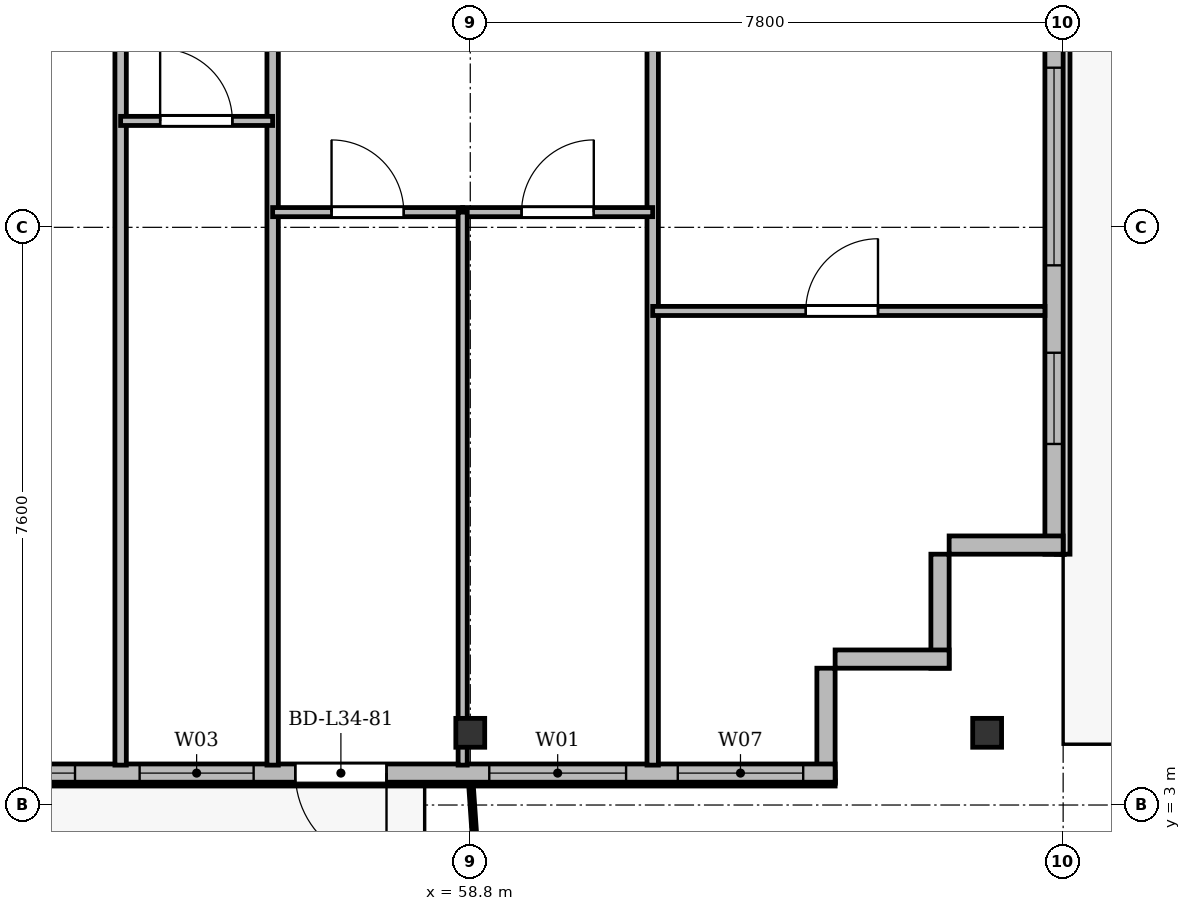
"""IFC4 building model, lengths in metres.
Left out: names, types, materials, properties, quantities, classifications, styles, units other than length and angle.
Written with IfcOpenShell. Run it as: python <this file> out.ifc"""

import sys

from ifc_helpers import new_model, si_unit, direction, frame, frame_2d, origin, origin_2d, place, context, subcontext, project, spatial, rectangle, i_section, extrude, source, transform, mapped, element, fill, save


model = new_model("IFC4")
c1 = context("Model", 3, precision=1e-05, world=origin(), true_north=direction((0.0, 1.0)))
c2 = subcontext(c1, "Body", "Model", "MODEL_VIEW")
j1 = project(units=[si_unit("LENGTHUNIT", "METRE"), si_unit("PLANEANGLEUNIT", "RADIAN")], contexts=[c1])
p1 = place(None, origin())
s1 = spatial("IfcSite", under=j1, at=p1, CompositionType="ELEMENT")
p2 = place(p1, origin())
s2 = spatial("IfcBuilding", under=s1, at=p2, CompositionType="ELEMENT")
p3 = place(p2, frame((0.0, 0.0, 132.1)))
s3 = spatial("IfcBuildingStorey", under=s2, at=p3, CompositionType="ELEMENT", Elevation=132.1)
m1 = source(origin(), c2, "Body", "SweptSolid", [
    extrude(i_section(OverallWidth=0.38, OverallDepth=0.38, WebThickness=0.02, FlangeThickness=0.03, at=origin_2d()), origin(), (0.0, 0.0, 1.0), 3.6),
])
for number, where, z_axis, x_axis in (
    (1, (58.8, 3.95, 0.0), (0.0, 0.0, 1.0), (1.0, 0.0, 0.0)),
    (2, (65.6, 3.95, 0.0), (0.0, 0.0, 1.0), (1.0, 0.0, 0.0)),
):
    element("IfcColumn", number, at=place(p3, frame(where, z_axis=z_axis, x_axis=x_axis)), inside=s3, PredefinedType="COLUMN", context=c2, shape_type="MappedRepresentation", body=[
        mapped(m1, transform((0.0, 0.0, 0.0), x_axis=(1.0, 0.0, 0.0), y_axis=(0.0, 1.0, 0.0), z_axis=(0.0, 0.0, 1.0), scale=1.0)),
    ])
p4 = place(p3, frame((66.48, 45.5, 0.0), z_axis=(0.0, 0.0, 1.0), x_axis=(0.0, -1.0, 0.0)))
e3 = element("IfcWall", 3, at=p4, inside=s3, PredefinedType="SOLIDWALL", context=c2, shape_type="SweptSolid", body=[
    extrude(rectangle(XDim=39.2, YDim=0.24, at=frame_2d((19.6, 0.0))), origin(), (0.0, 0.0, 1.0), 3.35),
])
p5 = place(p4, frame((9.6, 0.0, 0.0)))
e4 = element("IfcOpeningElement", 4, at=p5, cuts=e3, PredefinedType="OPENING", context=c2, shape_type="SweptSolid", body=[
    extrude(rectangle(XDim=1.2, YDim=2.2, at=frame_2d((0.6, 1.1))), frame((0.0, 0.13, 0.0), z_axis=(0.0, -1.0, 0.0), x_axis=(1.0, 0.0, 0.0)), (0.0, 0.0, 1.0), 0.26),
])
p6 = place(p4, frame((36.55, 0.0, 0.92)))
e5 = element("IfcOpeningElement", 5, at=p6, cuts=e3, PredefinedType="OPENING", context=c2, shape_type="SweptSolid", body=[
    extrude(rectangle(XDim=1.2, YDim=1.65, at=frame_2d((0.6, 0.825))), frame((0.0, 0.13, 0.0), z_axis=(0.0, -1.0, 0.0), x_axis=(1.0, 0.0, 0.0)), (0.0, 0.0, 1.0), 0.26),
])
p7 = place(p4, frame((32.8, 0.0, 0.92)))
e6 = element("IfcOpeningElement", 6, at=p7, cuts=e3, PredefinedType="OPENING", context=c2, shape_type="SweptSolid", body=[
    extrude(rectangle(XDim=2.6, YDim=1.9, at=frame_2d((1.3, 0.95))), frame((0.0, 0.13, 0.0), z_axis=(0.0, -1.0, 0.0), x_axis=(1.0, 0.0, 0.0)), (0.0, 0.0, 1.0), 0.26),
])
p8 = place(p4, frame((28.6, 0.0, 0.92)))
e7 = element("IfcOpeningElement", 7, at=p8, cuts=e3, PredefinedType="OPENING", context=c2, shape_type="SweptSolid", body=[
    extrude(rectangle(XDim=2.6, YDim=1.9, at=frame_2d((1.3, 0.95))), frame((0.0, 0.13, 0.0), z_axis=(0.0, -1.0, 0.0), x_axis=(1.0, 0.0, 0.0)), (0.0, 0.0, 1.0), 0.26),
])
p9 = place(p4, frame((21.4, 0.0, 0.92)))
e8 = element("IfcOpeningElement", 8, at=p9, cuts=e3, PredefinedType="OPENING", context=c2, shape_type="SweptSolid", body=[
    extrude(rectangle(XDim=2.6, YDim=1.9, at=frame_2d((1.3, 0.95))), frame((0.0, 0.13, 0.0), z_axis=(0.0, -1.0, 0.0), x_axis=(1.0, 0.0, 0.0)), (0.0, 0.0, 1.0), 0.26),
])
p10 = place(p4, frame((4.5, 0.0, 0.92)))
e9 = element("IfcOpeningElement", 9, at=p10, cuts=e3, PredefinedType="OPENING", context=c2, shape_type="SweptSolid", body=[
    extrude(rectangle(XDim=1.2, YDim=1.65, at=frame_2d((0.6, 0.825))), frame((0.0, 0.13, 0.0), z_axis=(0.0, -1.0, 0.0), x_axis=(1.0, 0.0, 0.0)), (0.0, 0.0, 1.0), 0.26),
])
p11 = place(p4, frame((1.15, 0.0, 0.92)))
e10 = element("IfcOpeningElement", 10, at=p11, cuts=e3, PredefinedType="OPENING", context=c2, shape_type="SweptSolid", body=[
    extrude(rectangle(XDim=1.2, YDim=1.65, at=frame_2d((0.6, 0.825))), frame((0.0, 0.13, 0.0), z_axis=(0.0, -1.0, 0.0), x_axis=(1.0, 0.0, 0.0)), (0.0, 0.0, 1.0), 0.26),
])
p12 = place(p3, frame((66.6, 6.42, 0.0), z_axis=(0.0, 0.0, 1.0), x_axis=(-1.0, 0.0, 0.0)))
e11 = element("IfcWall", 11, at=p12, inside=s3, PredefinedType="SOLIDWALL", context=c2, shape_type="SweptSolid", body=[
    extrude(rectangle(XDim=1.5, YDim=0.24, at=frame_2d((0.75, 0.0))), origin(), (0.0, 0.0, 1.0), 2.85),
])
for number, where, z_axis, x_axis in (
    (12, (64.98, 6.3, 0.0), (0.0, 0.0, 1.0), (0.0, -1.0, 0.0)),
    (13, (65.1, 4.92, 0.0), (0.0, 0.0, 1.0), (-1.0, 0.0, 0.0)),
):
    element("IfcWall", number, at=place(p3, frame(where, z_axis=z_axis, x_axis=x_axis)), inside=s3, PredefinedType="SOLIDWALL", context=c2, shape_type="SweptSolid", body=[
        extrude(rectangle(XDim=1.5, YDim=0.24, at=frame_2d((0.75, 0.0))), origin(), (0.0, 0.0, 1.0), 3.35),
    ])
p13 = place(p3, frame((63.48, 4.8, 0.0), z_axis=(0.0, 0.0, 1.0), x_axis=(0.0, -1.0, 0.0)))
e14 = element("IfcWall", 14, at=p13, inside=s3, PredefinedType="SOLIDWALL", context=c2, shape_type="SweptSolid", body=[
    extrude(rectangle(XDim=1.5, YDim=0.24, at=frame_2d((0.75, 0.0))), origin(), (0.0, 0.0, 1.0), 2.75),
])
p14 = place(p3, frame((63.6, 3.42, 0.0), z_axis=(0.0, 0.0, 1.0), x_axis=(-1.0, 0.0, 0.0)))
e15 = element("IfcWall", 15, at=p14, inside=s3, PredefinedType="SOLIDWALL", context=c2, shape_type="SweptSolid", body=[
    extrude(rectangle(XDim=52.8, YDim=0.24, at=frame_2d((26.4, 0.0))), origin(), (0.0, 0.0, 1.0), 3.35),
])
p15 = place(p14, frame((0.42, 0.0, 0.9)))
e16 = element("IfcOpeningElement", 16, at=p15, cuts=e15, PredefinedType="OPENING", context=c2, shape_type="SweptSolid", body=[
    extrude(rectangle(XDim=1.65, YDim=1.85, at=frame_2d((0.825, 0.925))), frame((0.0, 0.13, 0.0), z_axis=(0.0, -1.0, 0.0), x_axis=(1.0, 0.0, 0.0)), (0.0, 0.0, 1.0), 0.26),
])
p16 = place(p14, frame((2.75, 0.0, 0.9)))
e17 = element("IfcOpeningElement", 17, at=p16, cuts=e15, PredefinedType="OPENING", context=c2, shape_type="SweptSolid", body=[
    extrude(rectangle(XDim=1.8, YDim=1.8, at=frame_2d((0.9, 0.9))), frame((0.0, 0.13, 0.0), z_axis=(0.0, -1.0, 0.0), x_axis=(1.0, 0.0, 0.0)), (0.0, 0.0, 1.0), 0.26),
])
p17 = place(p14, frame((5.902, 0.0, 0.0)))
e18 = element("IfcOpeningElement", 18, at=p17, cuts=e15, PredefinedType="OPENING", context=c2, shape_type="SweptSolid", body=[
    extrude(rectangle(XDim=1.2, YDim=2.2, at=frame_2d((0.6, 1.1))), frame((0.0, 0.13, 0.0), z_axis=(0.0, -1.0, 0.0), x_axis=(1.0, 0.0, 0.0)), (0.0, 0.0, 1.0), 0.26),
])
p18 = place(p14, frame((7.65, 0.0, 0.9)))
e19 = element("IfcOpeningElement", 19, at=p18, cuts=e15, PredefinedType="OPENING", context=c2, shape_type="SweptSolid", body=[
    extrude(rectangle(XDim=1.5, YDim=1.75, at=frame_2d((0.75, 0.875))), frame((0.0, 0.13, 0.0), z_axis=(0.0, -1.0, 0.0), x_axis=(1.0, 0.0, 0.0)), (0.0, 0.0, 1.0), 0.26),
])
p19 = place(p14, frame((10.0, 0.0, 0.9)))
e20 = element("IfcOpeningElement", 20, at=p19, cuts=e15, PredefinedType="OPENING", context=c2, shape_type="SweptSolid", body=[
    extrude(rectangle(XDim=2.0, YDim=1.95, at=frame_2d((1.0, 0.975))), frame((0.0, 0.13, 0.0), z_axis=(0.0, -1.0, 0.0), x_axis=(1.0, 0.0, 0.0)), (0.0, 0.0, 1.0), 0.26),
])
p20 = place(p14, frame((12.975, 0.0, 0.9)))
e21 = element("IfcOpeningElement", 21, at=p20, cuts=e15, PredefinedType="OPENING", context=c2, shape_type="SweptSolid", body=[
    extrude(rectangle(XDim=1.65, YDim=1.85, at=frame_2d((0.825, 0.925))), frame((0.0, 0.13, 0.0), z_axis=(0.0, -1.0, 0.0), x_axis=(1.0, 0.0, 0.0)), (0.0, 0.0, 1.0), 0.26),
])
p21 = place(p14, frame((15.3, 0.0, 0.9)))
e22 = element("IfcOpeningElement", 22, at=p21, cuts=e15, PredefinedType="OPENING", context=c2, shape_type="SweptSolid", body=[
    extrude(rectangle(XDim=1.8, YDim=1.8, at=frame_2d((0.9, 0.9))), frame((0.0, 0.13, 0.0), z_axis=(0.0, -1.0, 0.0), x_axis=(1.0, 0.0, 0.0)), (0.0, 0.0, 1.0), 0.26),
])
p22 = place(p14, frame((17.85, 0.0, 0.9)))
e23 = element("IfcOpeningElement", 23, at=p22, cuts=e15, PredefinedType="OPENING", context=c2, shape_type="SweptSolid", body=[
    extrude(rectangle(XDim=1.5, YDim=1.75, at=frame_2d((0.75, 0.875))), frame((0.0, 0.13, 0.0), z_axis=(0.0, -1.0, 0.0), x_axis=(1.0, 0.0, 0.0)), (0.0, 0.0, 1.0), 0.26),
])
p23 = place(p14, frame((20.7, 0.0, 0.9)))
e24 = element("IfcOpeningElement", 24, at=p23, cuts=e15, PredefinedType="OPENING", context=c2, shape_type="SweptSolid", body=[
    extrude(rectangle(XDim=1.5, YDim=1.75, at=frame_2d((0.75, 0.875))), frame((0.0, 0.13, 0.0), z_axis=(0.0, -1.0, 0.0), x_axis=(1.0, 0.0, 0.0)), (0.0, 0.0, 1.0), 0.26),
])
p24 = place(p14, frame((23.75, 0.0, 0.9)))
e25 = element("IfcOpeningElement", 25, at=p24, cuts=e15, PredefinedType="OPENING", context=c2, shape_type="SweptSolid", body=[
    extrude(rectangle(XDim=2.0, YDim=1.95, at=frame_2d((1.0, 0.975))), frame((0.0, 0.13, 0.0), z_axis=(0.0, -1.0, 0.0), x_axis=(1.0, 0.0, 0.0)), (0.0, 0.0, 1.0), 0.26),
])
p25 = place(p14, frame((28.875, 0.0, 0.9)))
e26 = element("IfcOpeningElement", 26, at=p25, cuts=e15, PredefinedType="OPENING", context=c2, shape_type="SweptSolid", body=[
    extrude(rectangle(XDim=1.65, YDim=1.85, at=frame_2d((0.825, 0.925))), frame((0.0, 0.13, 0.0), z_axis=(0.0, -1.0, 0.0), x_axis=(1.0, 0.0, 0.0)), (0.0, 0.0, 1.0), 0.26),
])
p26 = place(p14, frame((34.478, 0.0, 0.0)))
e27 = element("IfcOpeningElement", 27, at=p26, cuts=e15, PredefinedType="OPENING", context=c2, shape_type="SweptSolid", body=[
    extrude(rectangle(XDim=1.2, YDim=2.2, at=frame_2d((0.6, 1.1))), frame((0.0, 0.13, 0.0), z_axis=(0.0, -1.0, 0.0), x_axis=(1.0, 0.0, 0.0)), (0.0, 0.0, 1.0), 0.26),
])
p27 = place(p14, frame((37.3, 0.0, 0.9)))
e28 = element("IfcOpeningElement", 28, at=p27, cuts=e15, PredefinedType="OPENING", context=c2, shape_type="SweptSolid", body=[
    extrude(rectangle(XDim=2.2, YDim=1.8, at=frame_2d((1.1, 0.9))), frame((0.0, 0.13, 0.0), z_axis=(0.0, -1.0, 0.0), x_axis=(1.0, 0.0, 0.0)), (0.0, 0.0, 1.0), 0.26),
])
p28 = place(p14, frame((41.05, 0.0, 0.9)))
e29 = element("IfcOpeningElement", 29, at=p28, cuts=e15, PredefinedType="OPENING", context=c2, shape_type="SweptSolid", body=[
    extrude(rectangle(XDim=1.5, YDim=1.75, at=frame_2d((0.75, 0.875))), frame((0.0, 0.13, 0.0), z_axis=(0.0, -1.0, 0.0), x_axis=(1.0, 0.0, 0.0)), (0.0, 0.0, 1.0), 0.26),
])
p29 = place(p14, frame((43.65, 0.0, 0.9)))
e30 = element("IfcOpeningElement", 30, at=p29, cuts=e15, PredefinedType="OPENING", context=c2, shape_type="SweptSolid", body=[
    extrude(rectangle(XDim=1.5, YDim=1.75, at=frame_2d((0.75, 0.875))), frame((0.0, 0.13, 0.0), z_axis=(0.0, -1.0, 0.0), x_axis=(1.0, 0.0, 0.0)), (0.0, 0.0, 1.0), 0.26),
])
p30 = place(p14, frame((45.775, 0.0, 0.9)))
e31 = element("IfcOpeningElement", 31, at=p30, cuts=e15, PredefinedType="OPENING", context=c2, shape_type="SweptSolid", body=[
    extrude(rectangle(XDim=1.65, YDim=1.85, at=frame_2d((0.825, 0.925))), frame((0.0, 0.13, 0.0), z_axis=(0.0, -1.0, 0.0), x_axis=(1.0, 0.0, 0.0)), (0.0, 0.0, 1.0), 0.26),
])
p31 = place(p14, frame((48.1, 0.0, 0.9)))
e32 = element("IfcOpeningElement", 32, at=p31, cuts=e15, PredefinedType="OPENING", context=c2, shape_type="SweptSolid", body=[
    extrude(rectangle(XDim=1.8, YDim=1.8, at=frame_2d((0.9, 0.9))), frame((0.0, 0.13, 0.0), z_axis=(0.0, -1.0, 0.0), x_axis=(1.0, 0.0, 0.0)), (0.0, 0.0, 1.0), 0.26),
])
p32 = place(p14, frame((50.705, 0.0, 0.9)))
e33 = element("IfcOpeningElement", 33, at=p32, cuts=e15, PredefinedType="OPENING", context=c2, shape_type="SweptSolid", body=[
    extrude(rectangle(XDim=1.5, YDim=1.75, at=frame_2d((0.75, 0.875))), frame((0.0, 0.13, 0.0), z_axis=(0.0, -1.0, 0.0), x_axis=(1.0, 0.0, 0.0)), (0.0, 0.0, 1.0), 0.26),
])
for number, where, z_axis, x_axis in (
    (34, (61.2, 3.525, 0.0), (0.0, 0.0, 1.0), (0.0, 1.0, 0.0)),
    (35, (54.2, 3.525, 0.0), (0.0, 0.0, 1.0), (0.0, 1.0, 0.0)),
    (36, (56.2, 3.525, 0.0), (0.0, 0.0, 1.0), (0.0, 1.0, 0.0)),
):
    element("IfcWall", number, at=place(p3, frame(where, z_axis=z_axis, x_axis=x_axis)), inside=s3, PredefinedType="PARTITIONING", context=c2, shape_type="SweptSolid", body=[
        extrude(rectangle(XDim=27.275, YDim=0.15, at=frame_2d((13.638, 0.0))), origin(), (0.0, 0.0, 1.0), 2.75),
    ])
p33 = place(p3, frame((54.2, 12.0, 0.0), z_axis=(0.0, 0.0, 1.0), x_axis=(1.0, 0.0, 0.0)))
e37 = element("IfcWall", 37, at=p33, inside=s3, PredefinedType="PARTITIONING", context=c2, shape_type="SweptSolid", body=[
    extrude(rectangle(XDim=2.0, YDim=0.12, at=frame_2d((1.0, 0.0))), origin(), (0.0, 0.0, 1.0), 3.35),
])
p34 = place(p33, frame((0.52, 0.0, 0.0)))
e38 = element("IfcOpeningElement", 38, at=p34, cuts=e37, PredefinedType="OPENING", context=c2, shape_type="SweptSolid", body=[
    extrude(rectangle(XDim=0.95, YDim=2.15, at=frame_2d((0.475, 1.075))), frame((0.0, 0.07, 0.0), z_axis=(0.0, -1.0, 0.0), x_axis=(1.0, 0.0, 0.0)), (0.0, 0.0, 1.0), 0.14),
])
p35 = place(p3, frame((56.2, 10.8, 0.0), z_axis=(0.0, 0.0, 1.0), x_axis=(1.0, 0.0, 0.0)))
e39 = element("IfcWall", 39, at=p35, inside=s3, PredefinedType="PARTITIONING", context=c2, shape_type="SweptSolid", body=[
    extrude(rectangle(XDim=2.5, YDim=0.12, at=frame_2d((1.25, 0.0))), origin(), (0.0, 0.0, 1.0), 3.0),
])
p36 = place(p35, frame((0.775, 0.0, 0.0)))
e40 = element("IfcOpeningElement", 40, at=p36, cuts=e39, PredefinedType="OPENING", context=c2, shape_type="SweptSolid", body=[
    extrude(rectangle(XDim=0.95, YDim=2.15, at=frame_2d((0.475, 1.075))), frame((0.0, 0.07, 0.0), z_axis=(0.0, -1.0, 0.0), x_axis=(1.0, 0.0, 0.0)), (0.0, 0.0, 1.0), 0.14),
])
p37 = place(p3, frame((58.7, 10.8, 0.0), z_axis=(0.0, 0.0, 1.0), x_axis=(1.0, 0.0, 0.0)))
e41 = element("IfcWall", 41, at=p37, inside=s3, PredefinedType="PARTITIONING", context=c2, shape_type="SweptSolid", body=[
    extrude(rectangle(XDim=2.5, YDim=0.12, at=frame_2d((1.25, 0.0))), origin(), (0.0, 0.0, 1.0), 2.85),
])
p38 = place(p37, frame((0.775, 0.0, 0.0)))
e42 = element("IfcOpeningElement", 42, at=p38, cuts=e41, PredefinedType="OPENING", context=c2, shape_type="SweptSolid", body=[
    extrude(rectangle(XDim=0.95, YDim=2.15, at=frame_2d((0.475, 1.075))), frame((0.0, 0.07, 0.0), z_axis=(0.0, -1.0, 0.0), x_axis=(1.0, 0.0, 0.0)), (0.0, 0.0, 1.0), 0.14),
])
p39 = place(p3, frame((58.7, 3.525, 0.0), z_axis=(0.0, 0.0, 1.0), x_axis=(0.0, 1.0, 0.0)))
e43 = element("IfcWall", 43, at=p39, inside=s3, PredefinedType="PARTITIONING", context=c2, shape_type="SweptSolid", body=[
    extrude(rectangle(XDim=7.275, YDim=0.12, at=frame_2d((3.638, 0.0))), origin(), (0.0, 0.0, 1.0), 2.75),
])
p40 = place(p3, frame((61.2, 9.5, 0.0), z_axis=(0.0, 0.0, 1.0), x_axis=(1.0, 0.0, 0.0)))
e44 = element("IfcWall", 44, at=p40, inside=s3, PredefinedType="PARTITIONING", context=c2, shape_type="SweptSolid", body=[
    extrude(rectangle(XDim=5.16, YDim=0.12, at=frame_2d((2.58, 0.0))), origin(), (0.0, 0.0, 1.0), 2.85),
])
p41 = place(p40, frame((2.014, 0.0, 0.0)))
e45 = element("IfcOpeningElement", 45, at=p41, cuts=e44, PredefinedType="OPENING", context=c2, shape_type="SweptSolid", body=[
    extrude(rectangle(XDim=0.95, YDim=2.15, at=frame_2d((0.475, 1.075))), frame((0.0, 0.07, 0.0), z_axis=(0.0, -1.0, 0.0), x_axis=(1.0, 0.0, 0.0)), (0.0, 0.0, 1.0), 0.14),
])
m2 = source(origin(), c2, "Body", "SweptSolid", [
    extrude(rectangle(XDim=1.2, YDim=1.65, at=frame_2d((0.6, 0.825))), frame((0.0, 0.03, 0.0), z_axis=(0.0, -1.0, 0.0), x_axis=(1.0, 0.0, 0.0)), (0.0, 0.0, 1.0), 0.06),
])
p42 = place(p6, origin())
e46 = element("IfcWindow", 46, at=p42, inside=s3, PartitioningType="SINGLE_PANEL", PredefinedType="WINDOW", context=c2, shape_type="MappedRepresentation", body=[
    mapped(m2, transform((0.0, 0.0, 0.0), x_axis=(1.0, 0.0, 0.0), y_axis=(0.0, 1.0, 0.0), z_axis=(0.0, 0.0, 1.0), scale=1.0)),
])
fill(e5, e46)
m3 = source(origin(), c2, "Body", "SweptSolid", [
    extrude(rectangle(XDim=2.6, YDim=1.9, at=frame_2d((1.3, 0.95))), frame((0.0, 0.03, 0.0), z_axis=(0.0, -1.0, 0.0), x_axis=(1.0, 0.0, 0.0)), (0.0, 0.0, 1.0), 0.06),
])
p43 = place(p7, origin())
e47 = element("IfcWindow", 47, at=p43, inside=s3, PartitioningType="SINGLE_PANEL", PredefinedType="WINDOW", context=c2, shape_type="MappedRepresentation", body=[
    mapped(m3, transform((0.0, 0.0, 0.0), x_axis=(1.0, 0.0, 0.0), y_axis=(0.0, 1.0, 0.0), z_axis=(0.0, 0.0, 1.0), scale=1.0)),
])
fill(e6, e47)
m4 = source(origin(), c2, "Body", "SweptSolid", [
    extrude(rectangle(XDim=1.65, YDim=1.85, at=frame_2d((0.825, 0.925))), frame((0.0, 0.03, 0.0), z_axis=(0.0, -1.0, 0.0), x_axis=(1.0, 0.0, 0.0)), (0.0, 0.0, 1.0), 0.06),
])
p44 = place(p15, origin())
e48 = element("IfcWindow", 48, at=p44, inside=s3, PartitioningType="SINGLE_PANEL", PredefinedType="WINDOW", context=c2, shape_type="MappedRepresentation", body=[
    mapped(m4, transform((0.0, 0.0, 0.0), x_axis=(1.0, 0.0, 0.0), y_axis=(0.0, 1.0, 0.0), z_axis=(0.0, 0.0, 1.0), scale=1.0)),
])
fill(e16, e48)
m5 = source(origin(), c2, "Body", "SweptSolid", [
    extrude(rectangle(XDim=1.8, YDim=1.8, at=frame_2d((0.9, 0.9))), frame((0.0, 0.03, 0.0), z_axis=(0.0, -1.0, 0.0), x_axis=(1.0, 0.0, 0.0)), (0.0, 0.0, 1.0), 0.06),
])
p45 = place(p16, origin())
e49 = element("IfcWindow", 49, at=p45, inside=s3, PartitioningType="SINGLE_PANEL", PredefinedType="WINDOW", context=c2, shape_type="MappedRepresentation", body=[
    mapped(m5, transform((0.0, 0.0, 0.0), x_axis=(1.0, 0.0, 0.0), y_axis=(0.0, 1.0, 0.0), z_axis=(0.0, 0.0, 1.0), scale=1.0)),
])
fill(e17, e49)
m6 = source(origin(), c2, "Body", "SweptSolid", [
    extrude(rectangle(XDim=1.2, YDim=2.2, at=frame_2d((0.6, 1.1))), frame((0.0, 0.025, 0.0), z_axis=(0.0, -1.0, 0.0), x_axis=(1.0, 0.0, 0.0)), (0.0, 0.0, 1.0), 0.05),
])
p46 = place(p17, origin())
e50 = element("IfcDoor", 50, at=p46, inside=s3, OperationType="SINGLE_SWING_LEFT", PredefinedType="DOOR", context=c2, shape_type="MappedRepresentation", body=[
    mapped(m6, transform((0.0, 0.0, 0.0), x_axis=(1.0, 0.0, 0.0), y_axis=(0.0, 1.0, 0.0), z_axis=(0.0, 0.0, 1.0), scale=1.0)),
])
fill(e18, e50)
m7 = source(origin(), c2, "Body", "SweptSolid", [
    extrude(rectangle(XDim=1.5, YDim=1.75, at=frame_2d((0.75, 0.875))), frame((0.0, 0.03, 0.0), z_axis=(0.0, -1.0, 0.0), x_axis=(1.0, 0.0, 0.0)), (0.0, 0.0, 1.0), 0.06),
])
p47 = place(p18, origin())
e51 = element("IfcWindow", 51, at=p47, inside=s3, PartitioningType="SINGLE_PANEL", PredefinedType="WINDOW", context=c2, shape_type="MappedRepresentation", body=[
    mapped(m7, transform((0.0, 0.0, 0.0), x_axis=(1.0, 0.0, 0.0), y_axis=(0.0, 1.0, 0.0), z_axis=(0.0, 0.0, 1.0), scale=1.0)),
])
fill(e19, e51)
m8 = source(origin(), c2, "Body", "SweptSolid", [
    extrude(rectangle(XDim=2.0, YDim=1.95, at=frame_2d((1.0, 0.975))), frame((0.0, 0.03, 0.0), z_axis=(0.0, -1.0, 0.0), x_axis=(1.0, 0.0, 0.0)), (0.0, 0.0, 1.0), 0.06),
])
p48 = place(p19, origin())
e52 = element("IfcWindow", 52, at=p48, inside=s3, PartitioningType="SINGLE_PANEL", PredefinedType="WINDOW", context=c2, shape_type="MappedRepresentation", body=[
    mapped(m8, transform((0.0, 0.0, 0.0), x_axis=(1.0, 0.0, 0.0), y_axis=(0.0, 1.0, 0.0), z_axis=(0.0, 0.0, 1.0), scale=1.0)),
])
fill(e20, e52)
m9 = source(origin(), c2, "Body", "SweptSolid", [
    extrude(rectangle(XDim=0.95, YDim=2.15, at=frame_2d((0.475, 1.075))), frame((0.0, 0.025, 0.0), z_axis=(0.0, -1.0, 0.0), x_axis=(1.0, 0.0, 0.0)), (0.0, 0.0, 1.0), 0.05),
])
p49 = place(p34, origin())
e53 = element("IfcDoor", 53, at=p49, inside=s3, OperationType="SINGLE_SWING_LEFT", PredefinedType="DOOR", context=c2, shape_type="MappedRepresentation", body=[
    mapped(m9, transform((0.0, 0.0, 0.0), x_axis=(1.0, 0.0, 0.0), y_axis=(0.0, 1.0, 0.0), z_axis=(0.0, 0.0, 1.0), scale=1.0)),
])
fill(e38, e53)
p50 = place(p36, origin())
e54 = element("IfcDoor", 54, at=p50, inside=s3, OperationType="SINGLE_SWING_LEFT", PredefinedType="DOOR", context=c2, shape_type="MappedRepresentation", body=[
    mapped(m9, transform((0.0, 0.0, 0.0), x_axis=(1.0, 0.0, 0.0), y_axis=(0.0, 1.0, 0.0), z_axis=(0.0, 0.0, 1.0), scale=1.0)),
])
fill(e40, e54)
p51 = place(p38, origin())
e55 = element("IfcDoor", 55, at=p51, inside=s3, OperationType="SINGLE_SWING_RIGHT", PredefinedType="DOOR", context=c2, shape_type="MappedRepresentation", body=[
    mapped(m9, transform((0.0, 0.0, 0.0), x_axis=(1.0, 0.0, 0.0), y_axis=(0.0, 1.0, 0.0), z_axis=(0.0, 0.0, 1.0), scale=1.0)),
])
fill(e42, e55)
p52 = place(p41, origin())
e56 = element("IfcDoor", 56, at=p52, inside=s3, OperationType="SINGLE_SWING_RIGHT", PredefinedType="DOOR", context=c2, shape_type="MappedRepresentation", body=[
    mapped(m9, transform((0.0, 0.0, 0.0), x_axis=(1.0, 0.0, 0.0), y_axis=(0.0, 1.0, 0.0), z_axis=(0.0, 0.0, 1.0), scale=1.0)),
])
fill(e45, e56)
save(model, sys.argv[1])
